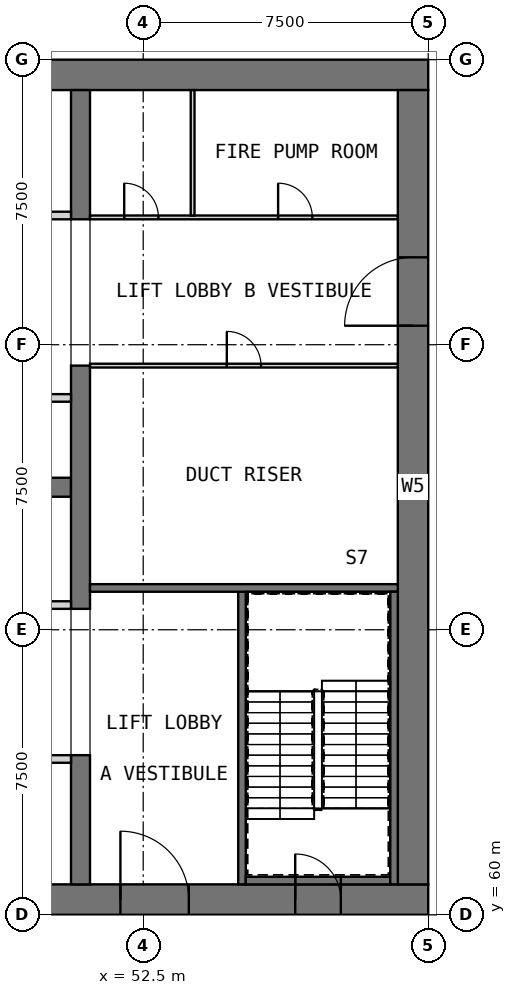
"""IFC4 building model, lengths in metres.
Left out: names, types, materials, properties, quantities, classifications, styles, units other than length and angle.
Written with IfcOpenShell. Run it as: python <this file> out.ifc"""

import sys

from ifc_helpers import new_model, si_unit, direction, frame, frame_2d, origin, place, context, subcontext, project, spatial, rectangle, extrude, element, fill, save


model = new_model("IFC4")
c1 = context("Model", 3, precision=1e-05, world=origin(), true_north=direction((0.0, 1.0)))
c2 = subcontext(c1, "Body", "Model", "MODEL_VIEW")
j1 = project(units=[si_unit("LENGTHUNIT", "METRE"), si_unit("PLANEANGLEUNIT", "RADIAN")], contexts=[c1])
p1 = place(None, origin())
s1 = spatial("IfcSite", under=j1, at=p1, CompositionType="ELEMENT")
p2 = place(p1, origin())
s2 = spatial("IfcBuilding", under=s1, at=p2, CompositionType="ELEMENT")
p3 = place(p2, frame((0.0, 0.0, 166.2)))
s3 = spatial("IfcBuildingStorey", under=s2, at=p3, CompositionType="ELEMENT", Elevation=166.2)
p4 = place(p3, frame((30.0, 60.4, 0.0), z_axis=(0.0, 0.0, 1.0), x_axis=(1.0, 0.0, 0.0)))
e1 = element("IfcWall", 1, at=p4, inside=s3, PredefinedType="SHEAR", context=c2, shape_type="SweptSolid", body=[
    extrude(rectangle(XDim=30.0, YDim=0.8, at=frame_2d((15.0, 0.0))), origin(), (0.0, 0.0, 1.0), 8.0),
])
p5 = place(p4, frame((21.9, 0.0, 0.0)))
e2 = element("IfcOpeningElement", 2, at=p5, cuts=e1, PredefinedType="OPENING", context=c2, shape_type="SweptSolid", body=[
    extrude(rectangle(XDim=1.8, YDim=2.1, at=frame_2d((0.9, 1.05))), frame((0.0, 0.41, 0.0), z_axis=(0.0, -1.0, 0.0), x_axis=(1.0, 0.0, 0.0)), (0.0, 0.0, 1.0), 0.82),
])
p6 = place(p4, frame((26.5, 0.0, 0.0)))
e3 = element("IfcOpeningElement", 3, at=p6, cuts=e1, PredefinedType="OPENING", context=c2, shape_type="SweptSolid", body=[
    extrude(rectangle(XDim=1.2, YDim=2.1, at=frame_2d((0.6, 1.05))), frame((0.0, 0.41, 0.0), z_axis=(0.0, -1.0, 0.0), x_axis=(1.0, 0.0, 0.0)), (0.0, 0.0, 1.0), 0.82),
])
p7 = place(p3, frame((30.0, 82.1, 0.0), z_axis=(0.0, 0.0, 1.0), x_axis=(1.0, 0.0, 0.0)))
e4 = element("IfcWall", 4, at=p7, inside=s3, PredefinedType="SHEAR", context=c2, shape_type="SweptSolid", body=[
    extrude(rectangle(XDim=30.0, YDim=0.8, at=frame_2d((15.0, 0.0))), origin(), (0.0, 0.0, 1.0), 8.0),
])
p8 = place(p3, frame((59.6, 60.8, 0.0), z_axis=(0.0, 0.0, 1.0), x_axis=(0.0, 1.0, 0.0)))
e5 = element("IfcWall", 5, at=p8, inside=s3, PredefinedType="SHEAR", context=c2, shape_type="SweptSolid", body=[
    extrude(rectangle(XDim=20.9, YDim=0.8, at=frame_2d((10.45, 0.0))), origin(), (0.0, 0.0, 1.0), 8.0),
])
p9 = place(p8, frame((14.7, 0.0, 0.0)))
e6 = element("IfcOpeningElement", 6, at=p9, cuts=e5, PredefinedType="OPENING", context=c2, shape_type="SweptSolid", body=[
    extrude(rectangle(XDim=1.8, YDim=2.1, at=frame_2d((0.9, 1.05))), frame((0.0, 0.41, 0.0), z_axis=(0.0, -1.0, 0.0), x_axis=(1.0, 0.0, 0.0)), (0.0, 0.0, 1.0), 0.82),
])
p10 = place(p3, frame((35.0, 71.25, 0.0), z_axis=(0.0, 0.0, 1.0), x_axis=(1.0, 0.0, 0.0)))
e7 = element("IfcWall", 7, at=p10, inside=s3, PredefinedType="SHEAR", context=c2, shape_type="SweptSolid", body=[
    extrude(rectangle(XDim=15.6, YDim=0.5, at=frame_2d((7.8, 0.0))), origin(), (0.0, 0.0, 1.0), 8.0),
])
p11 = place(p3, frame((50.85, 60.8, 0.0), z_axis=(0.0, 0.0, 1.0), x_axis=(0.0, 1.0, 0.0)))
e8 = element("IfcWall", 8, at=p11, inside=s3, PredefinedType="SHEAR", context=c2, shape_type="SweptSolid", body=[
    extrude(rectangle(XDim=3.4, YDim=0.5, at=frame_2d((1.7, 0.0))), origin(), (0.0, 0.0, 1.0), 8.0),
])
p12 = place(p3, frame((50.85, 68.05, 0.0), z_axis=(0.0, 0.0, 1.0), x_axis=(0.0, 1.0, 0.0)))
e9 = element("IfcWall", 9, at=p12, inside=s3, PredefinedType="SHEAR", context=c2, shape_type="SweptSolid", body=[
    extrude(rectangle(XDim=6.4, YDim=0.5, at=frame_2d((3.2, 0.0))), origin(), (0.0, 0.0, 1.0), 8.0),
])
p13 = place(p3, frame((50.85, 78.3, 0.0), z_axis=(0.0, 0.0, 1.0), x_axis=(0.0, 1.0, 0.0)))
e10 = element("IfcWall", 10, at=p13, inside=s3, PredefinedType="SHEAR", context=c2, shape_type="SweptSolid", body=[
    extrude(rectangle(XDim=3.4, YDim=0.5, at=frame_2d((1.7, 0.0))), origin(), (0.0, 0.0, 1.0), 8.0),
])
p14 = place(p3, frame((35.0, 64.1, 0.0), z_axis=(0.0, 0.0, 1.0), x_axis=(1.0, 0.0, 0.0)))
e11 = element("IfcWall", 11, at=p14, inside=s3, PredefinedType="PARTITIONING", context=c2, shape_type="SweptSolid", body=[
    extrude(rectangle(XDim=15.6, YDim=0.2, at=frame_2d((7.8, 0.0))), origin(), (0.0, 0.0, 1.0), 7.7),
])
p15 = place(p14, frame((4.225, 0.0, 0.0)))
e12 = element("IfcOpeningElement", 12, at=p15, cuts=e11, PredefinedType="OPENING", context=c2, shape_type="SweptSolid", body=[
    extrude(rectangle(XDim=0.9, YDim=2.1, at=frame_2d((0.45, 1.05))), frame((0.0, 0.11, 0.0), z_axis=(0.0, -1.0, 0.0), x_axis=(1.0, 0.0, 0.0)), (0.0, 0.0, 1.0), 0.22),
])
p16 = place(p14, frame((12.025, 0.0, 0.0)))
e13 = element("IfcOpeningElement", 13, at=p16, cuts=e11, PredefinedType="OPENING", context=c2, shape_type="SweptSolid", body=[
    extrude(rectangle(XDim=0.9, YDim=2.1, at=frame_2d((0.45, 1.05))), frame((0.0, 0.11, 0.0), z_axis=(0.0, -1.0, 0.0), x_axis=(1.0, 0.0, 0.0)), (0.0, 0.0, 1.0), 0.22),
])
p17 = place(p3, frame((35.0, 68.15, 0.0), z_axis=(0.0, 0.0, 1.0), x_axis=(1.0, 0.0, 0.0)))
e14 = element("IfcWall", 14, at=p17, inside=s3, PredefinedType="PARTITIONING", context=c2, shape_type="SweptSolid", body=[
    extrude(rectangle(XDim=15.6, YDim=0.2, at=frame_2d((7.8, 0.0))), origin(), (0.0, 0.0, 1.0), 7.7),
])
p18 = place(p17, frame((4.0, 0.0, 0.0)))
e15 = element("IfcOpeningElement", 15, at=p18, cuts=e14, PredefinedType="OPENING", context=c2, shape_type="SweptSolid", body=[
    extrude(rectangle(XDim=0.9, YDim=2.1, at=frame_2d((0.45, 1.05))), frame((0.0, 0.11, 0.0), z_axis=(0.0, -1.0, 0.0), x_axis=(1.0, 0.0, 0.0)), (0.0, 0.0, 1.0), 0.22),
])
p19 = place(p17, frame((11.8, 0.0, 0.0)))
e16 = element("IfcOpeningElement", 16, at=p19, cuts=e14, PredefinedType="OPENING", context=c2, shape_type="SweptSolid", body=[
    extrude(rectangle(XDim=0.9, YDim=2.1, at=frame_2d((0.45, 1.05))), frame((0.0, 0.11, 0.0), z_axis=(0.0, -1.0, 0.0), x_axis=(1.0, 0.0, 0.0)), (0.0, 0.0, 1.0), 0.22),
])
p20 = place(p3, frame((35.0, 73.6, 0.0), z_axis=(0.0, 0.0, 1.0), x_axis=(1.0, 0.0, 0.0)))
e17 = element("IfcWall", 17, at=p20, inside=s3, PredefinedType="SOLIDWALL", context=c2, shape_type="SweptSolid", body=[
    extrude(rectangle(XDim=15.6, YDim=0.2, at=frame_2d((7.8, 0.0))), origin(), (0.0, 0.0, 1.0), 8.0),
])
p21 = place(p20, frame((0.75, 0.0, 0.0)))
e18 = element("IfcOpeningElement", 18, at=p21, cuts=e17, PredefinedType="OPENING", context=c2, shape_type="SweptSolid", body=[
    extrude(rectangle(XDim=1.1, YDim=2.1, at=frame_2d((0.55, 1.05))), frame((0.0, 0.11, 0.0), z_axis=(0.0, -1.0, 0.0), x_axis=(1.0, 0.0, 0.0)), (0.0, 0.0, 1.0), 0.22),
])
p22 = place(p20, frame((3.35, 0.0, 0.0)))
e19 = element("IfcOpeningElement", 19, at=p22, cuts=e17, PredefinedType="OPENING", context=c2, shape_type="SweptSolid", body=[
    extrude(rectangle(XDim=1.1, YDim=2.1, at=frame_2d((0.55, 1.05))), frame((0.0, 0.11, 0.0), z_axis=(0.0, -1.0, 0.0), x_axis=(1.0, 0.0, 0.0)), (0.0, 0.0, 1.0), 0.22),
])
p23 = place(p20, frame((5.95, 0.0, 0.0)))
e20 = element("IfcOpeningElement", 20, at=p23, cuts=e17, PredefinedType="OPENING", context=c2, shape_type="SweptSolid", body=[
    extrude(rectangle(XDim=1.1, YDim=2.1, at=frame_2d((0.55, 1.05))), frame((0.0, 0.11, 0.0), z_axis=(0.0, -1.0, 0.0), x_axis=(1.0, 0.0, 0.0)), (0.0, 0.0, 1.0), 0.22),
])
p24 = place(p20, frame((8.55, 0.0, 0.0)))
e21 = element("IfcOpeningElement", 21, at=p24, cuts=e17, PredefinedType="OPENING", context=c2, shape_type="SweptSolid", body=[
    extrude(rectangle(XDim=1.1, YDim=2.1, at=frame_2d((0.55, 1.05))), frame((0.0, 0.11, 0.0), z_axis=(0.0, -1.0, 0.0), x_axis=(1.0, 0.0, 0.0)), (0.0, 0.0, 1.0), 0.22),
])
p25 = place(p20, frame((11.15, 0.0, 0.0)))
e22 = element("IfcOpeningElement", 22, at=p25, cuts=e17, PredefinedType="OPENING", context=c2, shape_type="SweptSolid", body=[
    extrude(rectangle(XDim=1.1, YDim=2.1, at=frame_2d((0.55, 1.05))), frame((0.0, 0.11, 0.0), z_axis=(0.0, -1.0, 0.0), x_axis=(1.0, 0.0, 0.0)), (0.0, 0.0, 1.0), 0.22),
])
p26 = place(p20, frame((13.75, 0.0, 0.0)))
e23 = element("IfcOpeningElement", 23, at=p26, cuts=e17, PredefinedType="OPENING", context=c2, shape_type="SweptSolid", body=[
    extrude(rectangle(XDim=1.1, YDim=2.1, at=frame_2d((0.55, 1.05))), frame((0.0, 0.11, 0.0), z_axis=(0.0, -1.0, 0.0), x_axis=(1.0, 0.0, 0.0)), (0.0, 0.0, 1.0), 0.22),
])
p27 = place(p3, frame((35.0, 78.4, 0.0), z_axis=(0.0, 0.0, 1.0), x_axis=(1.0, 0.0, 0.0)))
e24 = element("IfcWall", 24, at=p27, inside=s3, PredefinedType="SOLIDWALL", context=c2, shape_type="SweptSolid", body=[
    extrude(rectangle(XDim=15.6, YDim=0.2, at=frame_2d((7.8, 0.0))), origin(), (0.0, 0.0, 1.0), 8.0),
])
p28 = place(p27, frame((0.75, 0.0, 0.0)))
e25 = element("IfcOpeningElement", 25, at=p28, cuts=e24, PredefinedType="OPENING", context=c2, shape_type="SweptSolid", body=[
    extrude(rectangle(XDim=1.1, YDim=2.1, at=frame_2d((0.55, 1.05))), frame((0.0, 0.11, 0.0), z_axis=(0.0, -1.0, 0.0), x_axis=(1.0, 0.0, 0.0)), (0.0, 0.0, 1.0), 0.22),
])
p29 = place(p27, frame((3.35, 0.0, 0.0)))
e26 = element("IfcOpeningElement", 26, at=p29, cuts=e24, PredefinedType="OPENING", context=c2, shape_type="SweptSolid", body=[
    extrude(rectangle(XDim=1.1, YDim=2.1, at=frame_2d((0.55, 1.05))), frame((0.0, 0.11, 0.0), z_axis=(0.0, -1.0, 0.0), x_axis=(1.0, 0.0, 0.0)), (0.0, 0.0, 1.0), 0.22),
])
p30 = place(p27, frame((11.15, 0.0, 0.0)))
e27 = element("IfcOpeningElement", 27, at=p30, cuts=e24, PredefinedType="OPENING", context=c2, shape_type="SweptSolid", body=[
    extrude(rectangle(XDim=1.1, YDim=2.1, at=frame_2d((0.55, 1.05))), frame((0.0, 0.11, 0.0), z_axis=(0.0, -1.0, 0.0), x_axis=(1.0, 0.0, 0.0)), (0.0, 0.0, 1.0), 0.22),
])
p31 = place(p27, frame((13.75, 0.0, 0.0)))
e28 = element("IfcOpeningElement", 28, at=p31, cuts=e24, PredefinedType="OPENING", context=c2, shape_type="SweptSolid", body=[
    extrude(rectangle(XDim=1.1, YDim=2.1, at=frame_2d((0.55, 1.05))), frame((0.0, 0.11, 0.0), z_axis=(0.0, -1.0, 0.0), x_axis=(1.0, 0.0, 0.0)), (0.0, 0.0, 1.0), 0.22),
])
p32 = place(p3, frame((55.1, 60.8, 0.0), z_axis=(0.0, 0.0, 1.0), x_axis=(0.0, 1.0, 0.0)))
e29 = element("IfcWall", 29, at=p32, inside=s3, PredefinedType="SOLIDWALL", context=c2, shape_type="SweptSolid", body=[
    extrude(rectangle(XDim=7.8, YDim=0.2, at=frame_2d((3.9, 0.0))), origin(), (0.0, 0.0, 1.0), 7.7),
])
p33 = place(p3, frame((51.1, 68.6, 0.0), z_axis=(0.0, 0.0, 1.0), x_axis=(1.0, 0.0, 0.0)))
e30 = element("IfcWall", 30, at=p33, inside=s3, PredefinedType="SOLIDWALL", context=c2, shape_type="SweptSolid", body=[
    extrude(rectangle(XDim=8.1, YDim=0.2, at=frame_2d((4.05, 0.0))), origin(), (0.0, 0.0, 1.0), 7.7),
])
for number, where, z_axis, x_axis in (
    (31, (55.2, 60.9, 0.0), (0.0, 0.0, 1.0), (1.0, 0.0, 0.0)),
    (32, (57.7, 60.9, 0.0), (0.0, 0.0, 1.0), (1.0, 0.0, 0.0)),
):
    element("IfcWall", number, at=place(p3, frame(where, z_axis=z_axis, x_axis=x_axis)), inside=s3, PredefinedType="SOLIDWALL", context=c2, shape_type="SweptSolid", body=[
        extrude(rectangle(XDim=1.3, YDim=0.2, at=frame_2d((0.65, 0.0))), origin(), (0.0, 0.0, 1.0), 7.7),
    ])
p34 = place(p3, frame((59.1, 60.8, 0.0), z_axis=(0.0, 0.0, 1.0), x_axis=(0.0, 1.0, 0.0)))
e33 = element("IfcWall", 33, at=p34, inside=s3, PredefinedType="SOLIDWALL", context=c2, shape_type="SweptSolid", body=[
    extrude(rectangle(XDim=7.7, YDim=0.2, at=frame_2d((3.85, 0.0))), origin(), (0.0, 0.0, 1.0), 7.7),
])
p35 = place(p3, frame((56.5, 60.9, 3.2), z_axis=(0.0, 0.0, 1.0), x_axis=(1.0, 0.0, 0.0)))
e34 = element("IfcWall", 34, at=p35, inside=s3, PredefinedType="SOLIDWALL", context=c2, shape_type="SweptSolid", body=[
    extrude(rectangle(XDim=1.2, YDim=0.2, at=frame_2d((0.6, 0.0))), origin(), (0.0, 0.0, 1.0), 4.5),
])
p36 = place(p3, frame((51.1, 74.45, 0.0), z_axis=(0.0, 0.0, 1.0), x_axis=(1.0, 0.0, 0.0)))
e35 = element("IfcWall", 35, at=p36, inside=s3, PredefinedType="PARTITIONING", context=c2, shape_type="SweptSolid", body=[
    extrude(rectangle(XDim=8.1, YDim=0.1, at=frame_2d((4.05, 0.0))), origin(), (0.0, 0.0, 1.0), 7.7),
])
p37 = place(p36, frame((3.6, 0.0, 0.0)))
e36 = element("IfcOpeningElement", 36, at=p37, cuts=e35, PredefinedType="OPENING", context=c2, shape_type="SweptSolid", body=[
    extrude(rectangle(XDim=0.9, YDim=2.1, at=frame_2d((0.45, 1.05))), frame((0.0, 0.06, 0.0), z_axis=(0.0, -1.0, 0.0), x_axis=(1.0, 0.0, 0.0)), (0.0, 0.0, 1.0), 0.12),
])
p38 = place(p3, frame((51.1, 78.35, 0.0), z_axis=(0.0, 0.0, 1.0), x_axis=(1.0, 0.0, 0.0)))
e37 = element("IfcWall", 37, at=p38, inside=s3, PredefinedType="PARTITIONING", context=c2, shape_type="SweptSolid", body=[
    extrude(rectangle(XDim=8.1, YDim=0.1, at=frame_2d((4.05, 0.0))), origin(), (0.0, 0.0, 1.0), 7.7),
])
p39 = place(p38, frame((0.9, 0.0, 0.0)))
e38 = element("IfcOpeningElement", 38, at=p39, cuts=e37, PredefinedType="OPENING", context=c2, shape_type="SweptSolid", body=[
    extrude(rectangle(XDim=0.9, YDim=2.1, at=frame_2d((0.45, 1.05))), frame((0.0, 0.06, 0.0), z_axis=(0.0, -1.0, 0.0), x_axis=(1.0, 0.0, 0.0)), (0.0, 0.0, 1.0), 0.12),
])
p40 = place(p38, frame((4.95, 0.0, 0.0)))
e39 = element("IfcOpeningElement", 39, at=p40, cuts=e37, PredefinedType="OPENING", context=c2, shape_type="SweptSolid", body=[
    extrude(rectangle(XDim=0.9, YDim=2.1, at=frame_2d((0.45, 1.05))), frame((0.0, 0.06, 0.0), z_axis=(0.0, -1.0, 0.0), x_axis=(1.0, 0.0, 0.0)), (0.0, 0.0, 1.0), 0.12),
])
p41 = place(p3, frame((53.8, 78.4, 0.0), z_axis=(0.0, 0.0, 1.0), x_axis=(0.0, 1.0, 0.0)))
e40 = element("IfcWall", 40, at=p41, inside=s3, PredefinedType="PARTITIONING", context=c2, shape_type="SweptSolid", body=[
    extrude(rectangle(XDim=3.3, YDim=0.1, at=frame_2d((1.65, 0.0))), origin(), (0.0, 0.0, 1.0), 7.7),
])
p42 = place(p5, origin())
e41 = element("IfcDoor", 41, at=p42, inside=s3, OperationType="DOUBLE_DOOR_SINGLE_SWING", PredefinedType="DOOR", context=c2, shape_type="SweptSolid", body=[
    extrude(rectangle(XDim=1.8, YDim=2.1, at=frame_2d((0.9, 1.05))), frame((0.0, 0.025, 0.0), z_axis=(0.0, -1.0, 0.0), x_axis=(1.0, 0.0, 0.0)), (0.0, 0.0, 1.0), 0.05),
])
fill(e2, e41)
p43 = place(p9, origin())
e42 = element("IfcDoor", 42, at=p43, inside=s3, OperationType="DOUBLE_DOOR_SINGLE_SWING", PredefinedType="DOOR", context=c2, shape_type="SweptSolid", body=[
    extrude(rectangle(XDim=1.8, YDim=2.1, at=frame_2d((0.9, 1.05))), frame((0.0, 0.025, 0.0), z_axis=(0.0, -1.0, 0.0), x_axis=(1.0, 0.0, 0.0)), (0.0, 0.0, 1.0), 0.05),
])
fill(e6, e42)
p44 = place(p6, origin())
e43 = element("IfcDoor", 43, at=p44, inside=s3, OperationType="SINGLE_SWING_LEFT", PredefinedType="DOOR", context=c2, shape_type="SweptSolid", body=[
    extrude(rectangle(XDim=1.2, YDim=2.1, at=frame_2d((0.6, 1.05))), frame((0.0, 0.025, 0.0), z_axis=(0.0, -1.0, 0.0), x_axis=(1.0, 0.0, 0.0)), (0.0, 0.0, 1.0), 0.05),
])
fill(e3, e43)
p45 = place(p37, origin())
e44 = element("IfcDoor", 44, at=p45, inside=s3, OperationType="SINGLE_SWING_LEFT", PredefinedType="DOOR", context=c2, shape_type="SweptSolid", body=[
    extrude(rectangle(XDim=0.9, YDim=2.1, at=frame_2d((0.45, 1.05))), frame((0.0, 0.025, 0.0), z_axis=(0.0, -1.0, 0.0), x_axis=(1.0, 0.0, 0.0)), (0.0, 0.0, 1.0), 0.05),
])
fill(e36, e44)
p46 = place(p39, origin())
e45 = element("IfcDoor", 45, at=p46, inside=s3, OperationType="SINGLE_SWING_LEFT", PredefinedType="DOOR", context=c2, shape_type="SweptSolid", body=[
    extrude(rectangle(XDim=0.9, YDim=2.1, at=frame_2d((0.45, 1.05))), frame((0.0, 0.025, 0.0), z_axis=(0.0, -1.0, 0.0), x_axis=(1.0, 0.0, 0.0)), (0.0, 0.0, 1.0), 0.05),
])
fill(e38, e45)
p47 = place(p40, origin())
e46 = element("IfcDoor", 46, at=p47, inside=s3, OperationType="SINGLE_SWING_RIGHT", PredefinedType="DOOR", context=c2, shape_type="SweptSolid", body=[
    extrude(rectangle(XDim=0.9, YDim=2.1, at=frame_2d((0.45, 1.05))), frame((0.0, 0.025, 0.0), z_axis=(0.0, -1.0, 0.0), x_axis=(1.0, 0.0, 0.0)), (0.0, 0.0, 1.0), 0.05),
])
fill(e39, e46)
save(model, sys.argv[1])
